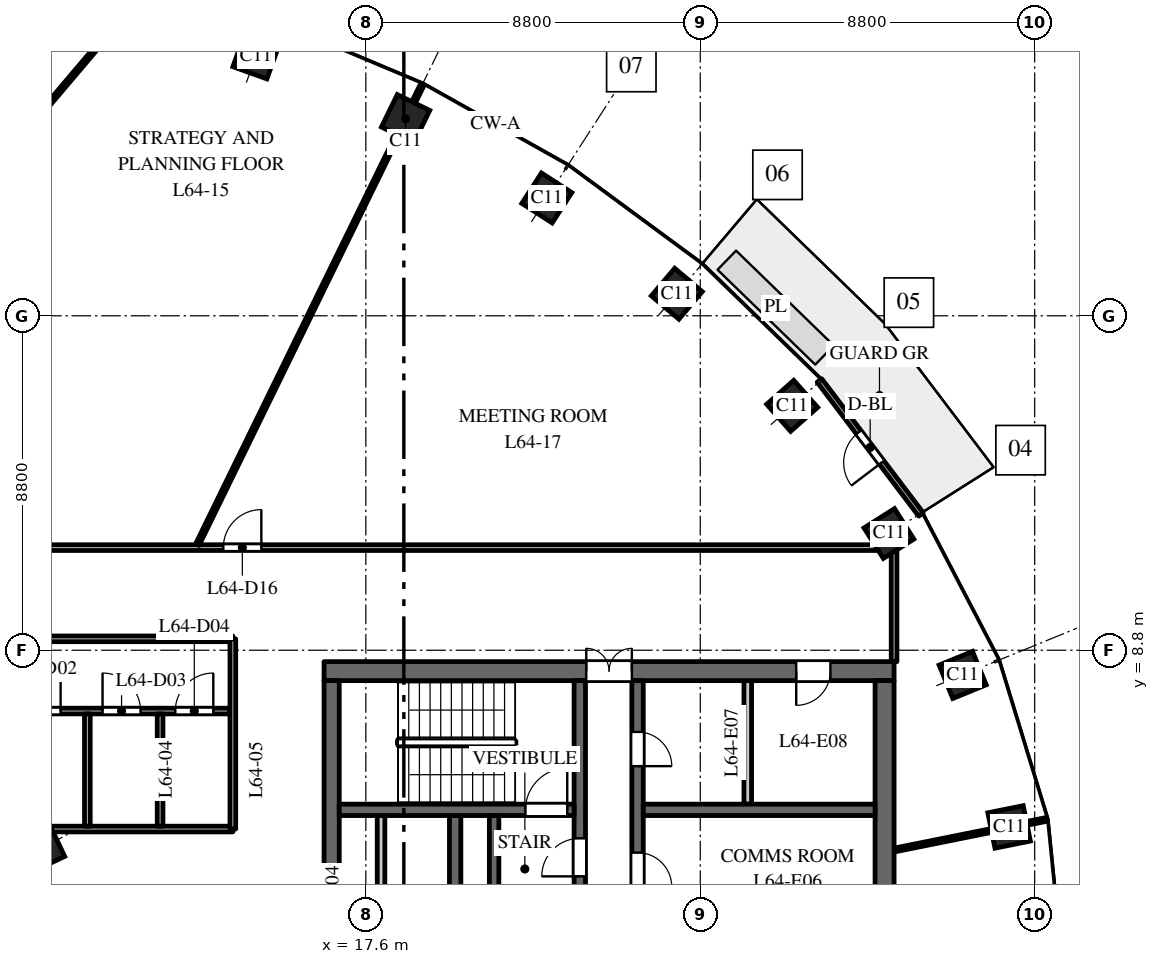
"""IFC4 building model, lengths in metres.
Left out: names, types, materials, properties, quantities, classifications, styles, units other than length and angle.
Written with IfcOpenShell. Run it as: python <this file> out.ifc"""

import sys

from ifc_helpers import new_model, si_unit, direction, frame, frame_2d, origin, origin_2d, place, context, subcontext, project, spatial, rectangle, extrude, element, fill, save


model = new_model("IFC4")
c1 = context("Model", 3, precision=1e-05, world=origin(), true_north=direction((0.0, 1.0)))
c2 = subcontext(c1, "Body", "Model", "MODEL_VIEW")
j1 = project(units=[si_unit("LENGTHUNIT", "METRE"), si_unit("PLANEANGLEUNIT", "RADIAN")], contexts=[c1])
p1 = place(None, origin())
s1 = spatial("IfcSite", under=j1, at=p1, CompositionType="ELEMENT")
p2 = place(p1, origin())
s2 = spatial("IfcBuilding", under=s1, at=p2, CompositionType="ELEMENT")
p3 = place(p2, frame((0.0, 0.0, 299.0)))
s3 = spatial("IfcBuildingStorey", under=s2, at=p3, CompositionType="ELEMENT", Elevation=299.0)
for number, where, z_axis, x_axis in (
    (1, (34.527, 4.151, 0.0), (0.0, 0.0, 1.0), (-0.197, 0.98, 0.0)),
    (2, (33.305, 8.149, 0.0), (0.0, 0.0, 1.0), (-0.379, 0.925, 0.0)),
    (3, (31.365, 11.871, 0.0), (0.0, 0.0, 1.0), (-0.535, 0.845, 0.0)),
    (4, (28.819, 15.23, 0.0), (0.0, 0.0, 1.0), (-0.663, 0.749, 0.0)),
    (5, (25.783, 18.18, 0.0), (0.0, 0.0, 1.0), (-0.763, 0.646, 0.0)),
    (6, (22.362, 20.7, 0.0), (0.0, 0.0, 1.0), (-0.84, 0.542, 0.0)),
    (7, (18.646, 22.785, 0.0), (0.0, 0.0, 1.0), (-0.898, 0.439, 0.0)),
    (8, (14.709, 24.441, 0.0), (0.0, 0.0, 1.0), (-0.941, 0.338, 0.0)),
):
    element("IfcColumn", number, at=place(p3, frame(where, z_axis=z_axis, x_axis=x_axis)), inside=s3, PredefinedType="COLUMN", context=c2, shape_type="SweptSolid", body=[
        extrude(rectangle(XDim=0.95, YDim=0.95, at=origin_2d()), origin(), (0.0, 0.0, 1.0), 4.0),
    ])
p4 = place(p3, frame((9.076, 3.588, 0.0), z_axis=(0.0, 0.0, 1.0), x_axis=(-0.428666979171, 0.903462573087, 0.0)))
e9 = element("IfcColumn", 9, at=p4, inside=s3, PredefinedType="COLUMN", context=c2, shape_type="SweptSolid", body=[
    extrude(rectangle(XDim=0.9, YDim=0.9, at=origin_2d()), origin(), (0.0, 0.0, 1.0), 4.0),
])
p5 = place(p3, frame((16.5, 8.25, 0.0), z_axis=(0.0, 0.0, 1.0), x_axis=(1.0, 0.0, 0.0)))
e10 = element("IfcWall", 10, at=p5, inside=s3, PredefinedType="SHEAR", context=c2, shape_type="SweptSolid", body=[
    extrude(rectangle(XDim=15.0, YDim=0.5, at=frame_2d((7.5, 0.0))), origin(), (0.0, 0.0, 1.0), 3.7),
])
p6 = place(p5, frame((6.9, 0.0, 0.0)))
e11 = element("IfcOpeningElement", 11, at=p6, cuts=e10, PredefinedType="OPENING", context=c2, shape_type="SweptSolid", body=[
    extrude(rectangle(XDim=1.2, YDim=2.1, at=frame_2d((0.6, 1.05))), frame((0.0, 0.26, 0.0), z_axis=(0.0, -1.0, 0.0), x_axis=(1.0, 0.0, 0.0)), (0.0, 0.0, 1.0), 0.52),
])
p7 = place(p5, frame((12.425, 0.0, 0.0)))
e12 = element("IfcOpeningElement", 12, at=p7, cuts=e10, PredefinedType="OPENING", context=c2, shape_type="SweptSolid", body=[
    extrude(rectangle(XDim=0.9, YDim=2.1, at=frame_2d((0.45, 1.05))), frame((0.0, 0.26, 0.0), z_axis=(0.0, -1.0, 0.0), x_axis=(1.0, 0.0, 0.0)), (0.0, 0.0, 1.0), 0.52),
])
p8 = place(p3, frame((18.0, -0.45, 0.0), z_axis=(0.0, 0.0, 1.0), x_axis=(0.0, 1.0, 0.0)))
e13 = element("IfcWall", 13, at=p8, inside=s3, PredefinedType="PARTITIONING", context=c2, shape_type="SweptSolid", body=[
    extrude(rectangle(XDim=4.9, YDim=0.2, at=frame_2d((2.45, 0.0))), origin(), (0.0, 0.0, 1.0), 3.7),
])
p9 = place(p8, frame((2.0, 0.0, 0.0)))
e14 = element("IfcOpeningElement", 14, at=p9, cuts=e13, PredefinedType="OPENING", context=c2, shape_type="SweptSolid", body=[
    extrude(rectangle(XDim=0.9, YDim=2.1, at=frame_2d((0.45, 1.05))), frame((0.0, 0.11, 0.0), z_axis=(0.0, -1.0, 0.0), x_axis=(1.0, 0.0, 0.0)), (0.0, 0.0, 1.0), 0.22),
])
p10 = place(p3, frame((19.95, -4.45, 0.0), z_axis=(0.0, 0.0, 1.0), x_axis=(0.0, 1.0, 0.0)))
e15 = element("IfcWall", 15, at=p10, inside=s3, PredefinedType="SHEAR", context=c2, shape_type="SweptSolid", body=[
    extrude(rectangle(XDim=8.9, YDim=0.3, at=frame_2d((4.45, 0.0))), origin(), (0.0, 0.0, 1.0), 3.7),
])
p11 = place(p10, frame((0.775, 0.0, 0.0)))
e16 = element("IfcOpeningElement", 16, at=p11, cuts=e15, PredefinedType="OPENING", context=c2, shape_type="SweptSolid", body=[
    extrude(rectangle(XDim=1.2, YDim=2.1, at=frame_2d((0.6, 1.05))), frame((0.0, 0.16, 0.0), z_axis=(0.0, -1.0, 0.0), x_axis=(1.0, 0.0, 0.0)), (0.0, 0.0, 1.0), 0.32),
])
p12 = place(p10, frame((6.0, 0.0, 0.0)))
e17 = element("IfcOpeningElement", 17, at=p12, cuts=e15, PredefinedType="OPENING", context=c2, shape_type="SweptSolid", body=[
    extrude(rectangle(XDim=0.9, YDim=2.1, at=frame_2d((0.45, 1.05))), frame((0.0, 0.16, 0.0), z_axis=(0.0, -1.0, 0.0), x_axis=(1.0, 0.0, 0.0)), (0.0, 0.0, 1.0), 0.32),
])
p13 = place(p3, frame((24.75, -8.0, 0.0), z_axis=(0.0, 0.0, 1.0), x_axis=(0.0, 1.0, 0.0)))
e18 = element("IfcWall", 18, at=p13, inside=s3, PredefinedType="SHEAR", context=c2, shape_type="SweptSolid", body=[
    extrude(rectangle(XDim=16.0, YDim=0.3, at=frame_2d((8.0, 0.0))), origin(), (0.0, 0.0, 1.0), 3.7),
])
p14 = place(p13, frame((4.425, 0.0, 0.0)))
e19 = element("IfcOpeningElement", 19, at=p14, cuts=e18, PredefinedType="OPENING", context=c2, shape_type="SweptSolid", body=[
    extrude(rectangle(XDim=1.1, YDim=2.1, at=frame_2d((0.55, 1.05))), frame((0.0, 0.16, 0.0), z_axis=(0.0, -1.0, 0.0), x_axis=(1.0, 0.0, 0.0)), (0.0, 0.0, 1.0), 0.32),
])
p15 = place(p13, frame((7.45, 0.0, 0.0)))
e20 = element("IfcOpeningElement", 20, at=p15, cuts=e18, PredefinedType="OPENING", context=c2, shape_type="SweptSolid", body=[
    extrude(rectangle(XDim=1.1, YDim=2.1, at=frame_2d((0.55, 1.05))), frame((0.0, 0.16, 0.0), z_axis=(0.0, -1.0, 0.0), x_axis=(1.0, 0.0, 0.0)), (0.0, 0.0, 1.0), 0.32),
])
p16 = place(p13, frame((10.575, 0.0, 0.0)))
e21 = element("IfcOpeningElement", 21, at=p16, cuts=e18, PredefinedType="OPENING", context=c2, shape_type="SweptSolid", body=[
    extrude(rectangle(XDim=0.9, YDim=2.1, at=frame_2d((0.45, 1.05))), frame((0.0, 0.16, 0.0), z_axis=(0.0, -1.0, 0.0), x_axis=(1.0, 0.0, 0.0)), (0.0, 0.0, 1.0), 0.32),
])
p17 = place(p13, frame((13.75, 0.0, 0.0)))
e22 = element("IfcOpeningElement", 22, at=p17, cuts=e18, PredefinedType="OPENING", context=c2, shape_type="SweptSolid", body=[
    extrude(rectangle(XDim=0.9, YDim=2.1, at=frame_2d((0.45, 1.05))), frame((0.0, 0.16, 0.0), z_axis=(0.0, -1.0, 0.0), x_axis=(1.0, 0.0, 0.0)), (0.0, 0.0, 1.0), 0.32),
])
p18 = place(p13, frame((1.35, 0.0, 0.0)))
e23 = element("IfcOpeningElement", 23, at=p18, cuts=e18, PredefinedType="OPENING", context=c2, shape_type="SweptSolid", body=[
    extrude(rectangle(XDim=0.9, YDim=2.1, at=frame_2d((0.45, 1.05))), frame((0.0, 0.16, 0.0), z_axis=(0.0, -1.0, 0.0), x_axis=(1.0, 0.0, 0.0)), (0.0, 0.0, 1.0), 0.32),
])
p19 = place(p3, frame((16.7, -8.0, 0.0), z_axis=(0.0, 0.0, 1.0), x_axis=(0.0, 1.0, 0.0)))
e24 = element("IfcWall", 24, at=p19, inside=s3, PredefinedType="SHEAR", context=c2, shape_type="SweptSolid", body=[
    extrude(rectangle(XDim=16.0, YDim=0.4, at=frame_2d((8.0, 0.0))), origin(), (0.0, 0.0, 1.0), 3.7),
])
p20 = place(p3, frame((31.25, -8.0, 0.0), z_axis=(0.0, 0.0, 1.0), x_axis=(0.0, 1.0, 0.0)))
e25 = element("IfcWall", 25, at=p20, inside=s3, PredefinedType="SHEAR", context=c2, shape_type="SweptSolid", body=[
    extrude(rectangle(XDim=16.0, YDim=0.5, at=frame_2d((8.0, 0.0))), origin(), (0.0, 0.0, 1.0), 3.7),
])
p21 = place(p3, frame((24.9, 4.6, 0.0), z_axis=(0.0, 0.0, 1.0), x_axis=(1.0, 0.0, 0.0)))
e26 = element("IfcWall", 26, at=p21, inside=s3, PredefinedType="SHEAR", context=c2, shape_type="SweptSolid", body=[
    extrude(rectangle(XDim=6.1, YDim=0.3, at=frame_2d((3.05, 0.0))), origin(), (0.0, 0.0, 1.0), 3.7),
])
p22 = place(p3, frame((27.65, 4.75, 0.0), z_axis=(0.0, 0.0, 1.0), x_axis=(0.0, 1.0, 0.0)))
e27 = element("IfcWall", 27, at=p22, inside=s3, PredefinedType="PARTITIONING", context=c2, shape_type="SweptSolid", body=[
    extrude(rectangle(XDim=3.25, YDim=0.2, at=frame_2d((1.625, 0.0))), origin(), (0.0, 0.0, 1.0), 3.7),
])
p23 = place(p3, frame((23.23, 2.25, 0.0), z_axis=(0.0, 0.0, 1.0), x_axis=(0.0, 1.0, 0.0)))
e28 = element("IfcWall", 28, at=p23, inside=s3, PredefinedType="SHEAR", context=c2, shape_type="SweptSolid", body=[
    extrude(rectangle(XDim=5.75, YDim=0.3, at=frame_2d((2.875, 0.0))), origin(), (0.0, 0.0, 1.0), 3.7),
])
p24 = place(p23, frame((0.6, 0.0, 0.0)))
e29 = element("IfcOpeningElement", 29, at=p24, cuts=e28, PredefinedType="OPENING", context=c2, shape_type="SweptSolid", body=[
    extrude(rectangle(XDim=1.0, YDim=2.1, at=frame_2d((0.5, 1.05))), frame((0.0, 0.16, 0.0), z_axis=(0.0, -1.0, 0.0), x_axis=(1.0, 0.0, 0.0)), (0.0, 0.0, 1.0), 0.32),
])
p25 = place(p3, frame((16.9, 4.6, 0.0), z_axis=(0.0, 0.0, 1.0), x_axis=(1.0, 0.0, 0.0)))
e30 = element("IfcWall", 30, at=p25, inside=s3, PredefinedType="SHEAR", context=c2, shape_type="SweptSolid", body=[
    extrude(rectangle(XDim=6.18, YDim=0.3, at=frame_2d((3.09, 0.0))), origin(), (0.0, 0.0, 1.0), 3.7),
])
p26 = place(p25, frame((4.9, 0.0, 0.0)))
e31 = element("IfcOpeningElement", 31, at=p26, cuts=e30, PredefinedType="OPENING", context=c2, shape_type="SweptSolid", body=[
    extrude(rectangle(XDim=1.1, YDim=2.1, at=frame_2d((0.55, 1.05))), frame((0.0, 0.16, 0.0), z_axis=(0.0, -1.0, 0.0), x_axis=(1.0, 0.0, 0.0)), (0.0, 0.0, 1.0), 0.32),
])
p27 = place(p3, frame((20.975, 2.25, 0.0), z_axis=(0.0, 0.0, 1.0), x_axis=(0.0, 1.0, 0.0)))
e32 = element("IfcWall", 32, at=p27, inside=s3, PredefinedType="SHEAR", context=c2, shape_type="SweptSolid", body=[
    extrude(rectangle(XDim=2.2, YDim=0.25, at=frame_2d((1.1, 0.0))), origin(), (0.0, 0.0, 1.0), 3.7),
])
p28 = place(p3, frame((32.208, 12.374, 0.0), z_axis=(0.0, 0.0, 1.0), x_axis=(-0.604045763106, 0.796949632081, 0.0)))
e33 = element("IfcWall", 33, at=p28, inside=s3, PredefinedType="STANDARD", context=c2, shape_type="SweptSolid", body=[
    extrude(rectangle(XDim=4.423, YDim=0.15, at=frame_2d((2.212, 0.0))), origin(), (0.0, 0.0, 1.0), 3.7),
])
p29 = place(p28, frame((1.712, 0.0, 0.0)))
e34 = element("IfcOpeningElement", 34, at=p29, cuts=e33, PredefinedType="OPENING", context=c2, shape_type="SweptSolid", body=[
    extrude(rectangle(XDim=1.0, YDim=2.4, at=frame_2d((0.5, 1.2))), frame((0.0, 0.085, 0.0), z_axis=(0.0, -1.0, 0.0), x_axis=(1.0, 0.0, 0.0)), (0.0, 0.0, 1.0), 0.17),
])
p30 = place(p3, frame((1.8, 9.1, 0.0), z_axis=(0.0, 0.0, 1.0), x_axis=(1.0, 0.0, 0.0)))
e35 = element("IfcWall", 35, at=p30, inside=s3, PredefinedType="PARTITIONING", context=c2, shape_type="SweptSolid", body=[
    extrude(rectangle(XDim=12.3, YDim=0.15, at=frame_2d((6.15, 0.0))), origin(), (0.0, 0.0, 1.0), 2.85),
])
p31 = place(p30, frame((2.9, 0.0, 0.0)))
e36 = element("IfcOpeningElement", 36, at=p31, cuts=e35, PredefinedType="OPENING", context=c2, shape_type="SweptSolid", body=[
    extrude(rectangle(XDim=1.0, YDim=2.1, at=frame_2d((0.5, 1.05))), frame((0.0, 0.085, 0.0), z_axis=(0.0, -1.0, 0.0), x_axis=(1.0, 0.0, 0.0)), (0.0, 0.0, 1.0), 0.17),
])
p32 = place(p3, frame((2.364, 7.2, 0.0), z_axis=(0.0, 0.0, 1.0), x_axis=(1.0, 0.0, 0.0)))
e37 = element("IfcWall", 37, at=p32, inside=s3, PredefinedType="PARTITIONING", context=c2, shape_type="SweptSolid", body=[
    extrude(rectangle(XDim=11.661, YDim=0.15, at=frame_2d((5.831, 0.0))), origin(), (0.0, 0.0, 1.0), 2.75),
])
p33 = place(p32, frame((6.204, 0.0, 0.0)))
e38 = element("IfcOpeningElement", 38, at=p33, cuts=e37, PredefinedType="OPENING", context=c2, shape_type="SweptSolid", body=[
    extrude(rectangle(XDim=1.0, YDim=2.1, at=frame_2d((0.5, 1.05))), frame((0.0, 0.085, 0.0), z_axis=(0.0, -1.0, 0.0), x_axis=(1.0, 0.0, 0.0)), (0.0, 0.0, 1.0), 0.17),
])
p34 = place(p32, frame((8.308, 0.0, 0.0)))
e39 = element("IfcOpeningElement", 39, at=p34, cuts=e37, PredefinedType="OPENING", context=c2, shape_type="SweptSolid", body=[
    extrude(rectangle(XDim=1.0, YDim=2.1, at=frame_2d((0.5, 1.05))), frame((0.0, 0.085, 0.0), z_axis=(0.0, -1.0, 0.0), x_axis=(1.0, 0.0, 0.0)), (0.0, 0.0, 1.0), 0.17),
])
p35 = place(p32, frame((10.222, 0.0, 0.0)))
e40 = element("IfcOpeningElement", 40, at=p35, cuts=e37, PredefinedType="OPENING", context=c2, shape_type="SweptSolid", body=[
    extrude(rectangle(XDim=1.0, YDim=2.1, at=frame_2d((0.5, 1.05))), frame((0.0, 0.085, 0.0), z_axis=(0.0, -1.0, 0.0), x_axis=(1.0, 0.0, 0.0)), (0.0, 0.0, 1.0), 0.17),
])
p36 = place(p3, frame((4.262, 11.5, 0.0), z_axis=(0.0, 0.0, 1.0), x_axis=(1.0, 0.0, 0.0)))
e41 = element("IfcWall", 41, at=p36, inside=s3, PredefinedType="PARTITIONING", context=c2, shape_type="SweptSolid", body=[
    extrude(rectangle(XDim=27.238, YDim=0.15, at=frame_2d((13.619, 0.0))), origin(), (0.0, 0.0, 1.0), 2.75),
])
p37 = place(p36, frame((0.476, 0.0, 0.0)))
e42 = element("IfcOpeningElement", 42, at=p37, cuts=e41, PredefinedType="OPENING", context=c2, shape_type="SweptSolid", body=[
    extrude(rectangle(XDim=1.0, YDim=2.1, at=frame_2d((0.5, 1.05))), frame((0.0, 0.085, 0.0), z_axis=(0.0, -1.0, 0.0), x_axis=(1.0, 0.0, 0.0)), (0.0, 0.0, 1.0), 0.17),
])
p38 = place(p36, frame((9.588, 0.0, 0.0)))
e43 = element("IfcOpeningElement", 43, at=p38, cuts=e41, PredefinedType="OPENING", context=c2, shape_type="SweptSolid", body=[
    extrude(rectangle(XDim=1.0, YDim=2.1, at=frame_2d((0.5, 1.05))), frame((0.0, 0.085, 0.0), z_axis=(0.0, -1.0, 0.0), x_axis=(1.0, 0.0, 0.0)), (0.0, 0.0, 1.0), 0.17),
])
p39 = place(p3, frame((5.306, 18.512, 0.0), z_axis=(0.0, 0.0, 1.0), x_axis=(0.646500054355, 0.762913939917, 0.0)))
e44 = element("IfcWall", 44, at=p39, inside=s3, PredefinedType="PARTITIONING", context=c2, shape_type="SweptSolid", body=[
    extrude(rectangle(XDim=10.239, YDim=0.1, at=frame_2d((5.119, 0.0))), origin(), (0.0, 0.0, 1.0), 3.0),
])
p40 = place(p3, frame((7.497, 4.095, 0.0), z_axis=(0.0, 0.0, 1.0), x_axis=(1.0, 0.0, 0.0)))
e45 = element("IfcWall", 45, at=p40, inside=s3, PredefinedType="PARTITIONING", context=c2, shape_type="SweptSolid", body=[
    extrude(rectangle(XDim=6.603, YDim=0.15, at=frame_2d((3.302, 0.0))), origin(), (0.0, 0.0, 1.0), 3.0),
])
for number, where, z_axis, x_axis in (
    (46, (10.272, 4.17, 0.0), (0.0, 0.0, 1.0), (0.0, 1.0, 0.0)),
    (47, (12.186, 4.17, 0.0), (0.0, 0.0, 1.0), (0.0, 1.0, 0.0)),
):
    element("IfcWall", number, at=place(p3, frame(where, z_axis=z_axis, x_axis=x_axis)), inside=s3, PredefinedType="PARTITIONING", context=c2, shape_type="SweptSolid", body=[
        extrude(rectangle(XDim=2.955, YDim=0.15, at=frame_2d((1.478, 0.0))), origin(), (0.0, 0.0, 1.0), 2.75),
    ])
p41 = place(p3, frame((13.167, 11.579, 0.0), z_axis=(0.0, 0.0, 1.0), x_axis=(0.439238726833, 0.898370380661, 0.0)))
e48 = element("IfcWall", 48, at=p41, inside=s3, PredefinedType="PARTITIONING", context=c2, shape_type="SweptSolid", body=[
    extrude(rectangle(XDim=13.475, YDim=0.1, at=frame_2d((6.738, 0.0))), origin(), (0.0, 0.0, 1.0), 3.0),
])
p42 = place(p3, frame((14.1, 4.095, 0.0), z_axis=(0.0, 0.0, 1.0), x_axis=(0.0, 1.0, 0.0)))
e49 = element("IfcWall", 49, at=p42, inside=s3, PredefinedType="PARTITIONING", context=c2, shape_type="SweptSolid", body=[
    extrude(rectangle(XDim=5.005, YDim=0.15, at=frame_2d((2.502, 0.0))), origin(), (0.0, 0.0, 1.0), 2.75),
])
p43 = place(p3, frame((31.5, 3.542, 0.0), z_axis=(0.0, 0.0, 1.0), x_axis=(0.980357474535, 0.197228857227, 0.0)))
e50 = element("IfcWall", 50, at=p43, inside=s3, PredefinedType="PARTITIONING", context=c2, shape_type="SweptSolid", body=[
    extrude(rectangle(XDim=4.092, YDim=0.1, at=frame_2d((2.046, 0.0))), origin(), (0.0, 0.0, 1.0), 3.0),
])
p44 = place(p3, frame((31.5, 8.5, 0.0), z_axis=(0.0, 0.0, 1.0), x_axis=(0.0, 1.0, 0.0)))
e51 = element("IfcWall", 51, at=p44, inside=s3, PredefinedType="PARTITIONING", context=c2, shape_type="SweptSolid", body=[
    extrude(rectangle(XDim=3.0, YDim=0.15, at=frame_2d((1.5, 0.0))), origin(), (0.0, 0.0, 1.0), 3.0),
])
p45 = place(p26, origin())
e52 = element("IfcDoor", 52, at=p45, inside=s3, OperationType="SINGLE_SWING_LEFT", PredefinedType="DOOR", context=c2, shape_type="SweptSolid", body=[
    extrude(rectangle(XDim=1.1, YDim=2.1, at=frame_2d((0.55, 1.05))), frame((0.0, 0.025, 0.0), z_axis=(0.0, -1.0, 0.0), x_axis=(1.0, 0.0, 0.0)), (0.0, 0.0, 1.0), 0.05),
])
fill(e31, e52)
p46 = place(p24, origin())
e53 = element("IfcDoor", 53, at=p46, inside=s3, OperationType="SINGLE_SWING_RIGHT", PredefinedType="DOOR", context=c2, shape_type="SweptSolid", body=[
    extrude(rectangle(XDim=1.0, YDim=2.1, at=frame_2d((0.5, 1.05))), frame((0.0, 0.025, 0.0), z_axis=(0.0, -1.0, 0.0), x_axis=(1.0, 0.0, 0.0)), (0.0, 0.0, 1.0), 0.05),
])
fill(e29, e53)
p47 = place(p6, origin())
e54 = element("IfcDoor", 54, at=p47, inside=s3, OperationType="DOUBLE_DOOR_DOUBLE_SWING", PredefinedType="DOOR", context=c2, shape_type="SweptSolid", body=[
    extrude(rectangle(XDim=1.2, YDim=2.1, at=frame_2d((0.6, 1.05))), frame((0.0, 0.025, 0.0), z_axis=(0.0, -1.0, 0.0), x_axis=(1.0, 0.0, 0.0)), (0.0, 0.0, 1.0), 0.05),
])
fill(e11, e54)
p48 = place(p16, origin())
e55 = element("IfcDoor", 55, at=p48, inside=s3, OperationType="SINGLE_SWING_LEFT", PredefinedType="DOOR", context=c2, shape_type="SweptSolid", body=[
    extrude(rectangle(XDim=0.9, YDim=2.1, at=frame_2d((0.45, 1.05))), frame((0.0, 0.025, 0.0), z_axis=(0.0, -1.0, 0.0), x_axis=(1.0, 0.0, 0.0)), (0.0, 0.0, 1.0), 0.05),
])
fill(e21, e55)
p49 = place(p17, origin())
e56 = element("IfcDoor", 56, at=p49, inside=s3, OperationType="SINGLE_SWING_LEFT", PredefinedType="DOOR", context=c2, shape_type="SweptSolid", body=[
    extrude(rectangle(XDim=0.9, YDim=2.1, at=frame_2d((0.45, 1.05))), frame((0.0, 0.025, 0.0), z_axis=(0.0, -1.0, 0.0), x_axis=(1.0, 0.0, 0.0)), (0.0, 0.0, 1.0), 0.05),
])
fill(e22, e56)
p50 = place(p7, origin())
e57 = element("IfcDoor", 57, at=p50, inside=s3, OperationType="SINGLE_SWING_LEFT", PredefinedType="DOOR", context=c2, shape_type="SweptSolid", body=[
    extrude(rectangle(XDim=0.9, YDim=2.1, at=frame_2d((0.45, 1.05))), frame((0.0, 0.025, 0.0), z_axis=(0.0, -1.0, 0.0), x_axis=(1.0, 0.0, 0.0)), (0.0, 0.0, 1.0), 0.05),
])
fill(e12, e57)
p51 = place(p29, origin())
e58 = element("IfcDoor", 58, at=p51, inside=s3, OperationType="SINGLE_SWING_LEFT", PredefinedType="DOOR", context=c2, shape_type="SweptSolid", body=[
    extrude(rectangle(XDim=1.0, YDim=2.4, at=frame_2d((0.5, 1.2))), frame((0.0, 0.025, 0.0), z_axis=(0.0, -1.0, 0.0), x_axis=(1.0, 0.0, 0.0)), (0.0, 0.0, 1.0), 0.05),
])
fill(e34, e58)
p52 = place(p33, origin())
e59 = element("IfcDoor", 59, at=p52, inside=s3, OperationType="SINGLE_SWING_RIGHT", PredefinedType="DOOR", context=c2, shape_type="SweptSolid", body=[
    extrude(rectangle(XDim=1.0, YDim=2.1, at=frame_2d((0.5, 1.05))), frame((0.0, 0.025, 0.0), z_axis=(0.0, -1.0, 0.0), x_axis=(1.0, 0.0, 0.0)), (0.0, 0.0, 1.0), 0.05),
])
fill(e38, e59)
p53 = place(p34, origin())
e60 = element("IfcDoor", 60, at=p53, inside=s3, OperationType="SINGLE_SWING_LEFT", PredefinedType="DOOR", context=c2, shape_type="SweptSolid", body=[
    extrude(rectangle(XDim=1.0, YDim=2.1, at=frame_2d((0.5, 1.05))), frame((0.0, 0.025, 0.0), z_axis=(0.0, -1.0, 0.0), x_axis=(1.0, 0.0, 0.0)), (0.0, 0.0, 1.0), 0.05),
])
fill(e39, e60)
p54 = place(p35, origin())
e61 = element("IfcDoor", 61, at=p54, inside=s3, OperationType="SINGLE_SWING_RIGHT", PredefinedType="DOOR", context=c2, shape_type="SweptSolid", body=[
    extrude(rectangle(XDim=1.0, YDim=2.1, at=frame_2d((0.5, 1.05))), frame((0.0, 0.025, 0.0), z_axis=(0.0, -1.0, 0.0), x_axis=(1.0, 0.0, 0.0)), (0.0, 0.0, 1.0), 0.05),
])
fill(e40, e61)
p55 = place(p38, origin())
e62 = element("IfcDoor", 62, at=p55, inside=s3, OperationType="SINGLE_SWING_RIGHT", PredefinedType="DOOR", context=c2, shape_type="SweptSolid", body=[
    extrude(rectangle(XDim=1.0, YDim=2.1, at=frame_2d((0.5, 1.05))), frame((0.0, 0.025, 0.0), z_axis=(0.0, -1.0, 0.0), x_axis=(1.0, 0.0, 0.0)), (0.0, 0.0, 1.0), 0.05),
])
fill(e43, e62)
save(model, sys.argv[1])
